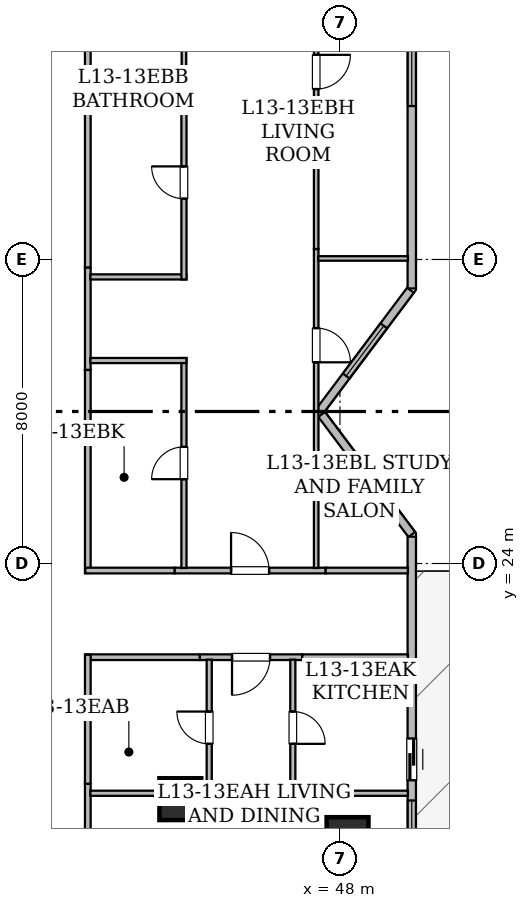
"""IFC4 building model, lengths in metres.
Left out: names, types, materials, properties, quantities, classifications, styles, units other than length and angle.
Written with IfcOpenShell. Run it as: python <this file> out.ifc"""

import sys

from ifc_helpers import new_model, si_unit, direction, frame, frame_2d, origin, origin_2d, place, context, subcontext, project, spatial, rectangle, hollow_rectangle, extrude, element, fill, save


model = new_model("IFC4")
c1 = context("Model", 3, precision=1e-05, world=origin(), true_north=direction((0.0, 1.0)))
c2 = subcontext(c1, "Body", "Model", "MODEL_VIEW")
j1 = project(units=[si_unit("LENGTHUNIT", "METRE"), si_unit("PLANEANGLEUNIT", "RADIAN")], contexts=[c1])
p1 = place(None, origin())
s1 = spatial("IfcSite", under=j1, at=p1, CompositionType="ELEMENT")
p2 = place(p1, origin())
s2 = spatial("IfcBuilding", under=s1, at=p2, CompositionType="ELEMENT")
p3 = place(p2, frame((0.0, 0.0, 55.2)))
s3 = spatial("IfcBuildingStorey", under=s2, at=p3, CompositionType="ELEMENT", Elevation=55.2)
for number, where, z_axis, x_axis in (
    (1, (48.2, 16.775, 0.0), (0.0, 0.0, 1.0), (1.0, 0.0, 0.0)),
    (2, (43.8, 17.8, 0.0), (0.0, 0.0, 1.0), (1.0, 0.0, 0.0)),
):
    element("IfcColumn", number, at=place(p3, frame(where, z_axis=z_axis, x_axis=x_axis)), inside=s3, PredefinedType="COLUMN", context=c2, shape_type="SweptSolid", body=[
        extrude(hollow_rectangle(XDim=1.1, YDim=1.1, WallThickness=0.055, at=origin_2d()), origin(), (0.0, 0.0, 1.0), 3.65),
    ])
p4 = place(p3, frame((49.89, 48.683, 0.0), z_axis=(0.0, 0.0, 1.0), x_axis=(0.0, -1.0, 0.0)))
e3 = element("IfcWall", 3, at=p4, inside=s3, PredefinedType="STANDARD", context=c2, shape_type="SweptSolid", body=[
    extrude(rectangle(XDim=17.446, YDim=0.22, at=frame_2d((8.723, 0.0))), origin(), (0.0, 0.0, 1.0), 3.43),
])
p5 = place(p4, frame((10.996, 0.0, 0.85)))
e4 = element("IfcOpeningElement", 4, at=p5, cuts=e3, PredefinedType="OPENING", context=c2, shape_type="SweptSolid", body=[
    extrude(rectangle(XDim=1.65, YDim=1.55, at=frame_2d((0.825, 0.775))), frame((0.0, 0.12, 0.0), z_axis=(0.0, -1.0, 0.0), x_axis=(1.0, 0.0, 0.0)), (0.0, 0.0, 1.0), 0.24),
])
p6 = place(p4, frame((3.061, 0.0, 0.85)))
e5 = element("IfcOpeningElement", 5, at=p6, cuts=e3, PredefinedType="OPENING", context=c2, shape_type="SweptSolid", body=[
    extrude(rectangle(XDim=1.65, YDim=1.55, at=frame_2d((0.825, 0.775))), frame((0.0, 0.12, 0.0), z_axis=(0.0, -1.0, 0.0), x_axis=(1.0, 0.0, 0.0)), (0.0, 0.0, 1.0), 0.24),
])
p7 = place(p3, frame((49.856, 31.191, 0.0), z_axis=(0.0, 0.0, 1.0), x_axis=(-0.600137081448, -0.799897170561, 0.0)))
e6 = element("IfcWall", 6, at=p7, inside=s3, PredefinedType="STANDARD", context=c2, shape_type="SweptSolid", body=[
    extrude(rectangle(XDim=3.989, YDim=0.22, at=frame_2d((1.995, 0.0))), origin(), (0.0, 0.0, 1.0), 3.43),
])
p8 = place(p7, frame((1.17, 0.0, 0.85)))
e7 = element("IfcOpeningElement", 7, at=p8, cuts=e6, PredefinedType="OPENING", context=c2, shape_type="SweptSolid", body=[
    extrude(rectangle(XDim=1.65, YDim=1.55, at=frame_2d((0.825, 0.775))), frame((0.0, 0.12, 0.0), z_axis=(0.0, -1.0, 0.0), x_axis=(1.0, 0.0, 0.0)), (0.0, 0.0, 1.0), 0.24),
])
p9 = place(p3, frame((47.519, 27.923, 0.0), z_axis=(0.0, 0.0, 1.0), x_axis=(0.600118645218, -0.799911002338, 0.0)))
e8 = element("IfcWall", 8, at=p9, inside=s3, PredefinedType="STANDARD", context=c2, shape_type="SweptSolid", body=[
    extrude(rectangle(XDim=3.951, YDim=0.22, at=frame_2d((1.975, 0.0))), origin(), (0.0, 0.0, 1.0), 3.43),
])
p10 = place(p3, frame((49.89, 24.707, 0.0), z_axis=(0.0, 0.0, 1.0), x_axis=(0.0, -1.0, 0.0)))
e9 = element("IfcWall", 9, at=p10, inside=s3, PredefinedType="STANDARD", context=c2, shape_type="SweptSolid", body=[
    extrude(rectangle(XDim=17.461, YDim=0.22, at=frame_2d((8.73, 0.0))), origin(), (0.0, 0.0, 1.0), 3.43),
])
p11 = place(p10, frame((5.311, 0.0, 0.0)))
e10 = element("IfcOpeningElement", 10, at=p11, cuts=e9, PredefinedType="OPENING", context=c2, shape_type="SweptSolid", body=[
    extrude(rectangle(XDim=1.1, YDim=2.2, at=frame_2d((0.55, 1.1))), frame((0.0, 0.12, 0.0), z_axis=(0.0, -1.0, 0.0), x_axis=(1.0, 0.0, 0.0)), (0.0, 0.0, 1.0), 0.24),
])
p12 = place(p10, frame((6.942, 0.0, 0.8)))
e11 = element("IfcOpeningElement", 11, at=p12, cuts=e9, PredefinedType="OPENING", context=c2, shape_type="SweptSolid", body=[
    extrude(rectangle(XDim=1.2, YDim=1.5, at=frame_2d((0.6, 0.75))), frame((0.0, 0.12, 0.0), z_axis=(0.0, -1.0, 0.0), x_axis=(1.0, 0.0, 0.0)), (0.0, 0.0, 1.0), 0.24),
])
p13 = place(p10, frame((11.679, 0.0, 0.85)))
e12 = element("IfcOpeningElement", 12, at=p13, cuts=e9, PredefinedType="OPENING", context=c2, shape_type="SweptSolid", body=[
    extrude(rectangle(XDim=1.65, YDim=1.55, at=frame_2d((0.825, 0.775))), frame((0.0, 0.12, 0.0), z_axis=(0.0, -1.0, 0.0), x_axis=(1.0, 0.0, 0.0)), (0.0, 0.0, 1.0), 0.24),
])
p14 = place(p3, frame((47.009, 21.535, 0.0), z_axis=(0.0, 0.0, 1.0), x_axis=(-1.0, 0.0, 0.0)))
e13 = element("IfcWall", 13, at=p14, inside=s3, PredefinedType="STANDARD", context=c2, shape_type="SweptSolid", body=[
    extrude(rectangle(XDim=2.698, YDim=0.15, at=frame_2d((1.349, 0.0))), origin(), (0.0, 0.0, 1.0), 3.43),
])
p15 = place(p14, frame((0.849, 0.0, 0.0)))
e14 = element("IfcOpeningElement", 14, at=p15, cuts=e13, PredefinedType="OPENING", context=c2, shape_type="SweptSolid", body=[
    extrude(rectangle(XDim=1.0, YDim=2.15, at=frame_2d((0.5, 1.075))), frame((0.0, 0.085, 0.0), z_axis=(0.0, -1.0, 0.0), x_axis=(1.0, 0.0, 0.0)), (0.0, 0.0, 1.0), 0.17),
])
p16 = place(p3, frame((41.365, 18.204, 0.0), z_axis=(0.0, 0.0, 1.0), x_axis=(0.0, -1.0, 0.0)))
e15 = element("IfcWall", 15, at=p16, inside=s3, PredefinedType="STANDARD", context=c2, shape_type="SweptSolid", body=[
    extrude(rectangle(XDim=1.304, YDim=0.15, at=frame_2d((0.652, 0.0))), origin(), (0.0, 0.0, 1.0), 3.43),
])
p17 = place(p3, frame((44.311, 21.535, 0.0), z_axis=(0.0, 0.0, 1.0), x_axis=(-1.0, 0.0, 0.0)))
e16 = element("IfcWall", 16, at=p17, inside=s3, PredefinedType="STANDARD", context=c2, shape_type="SweptSolid", body=[
    extrude(rectangle(XDim=3.011, YDim=0.15, at=frame_2d((1.505, 0.0))), origin(), (0.0, 0.0, 1.0), 2.647),
])
p18 = place(p3, frame((41.365, 21.6, 0.0), z_axis=(0.0, 0.0, 1.0), x_axis=(0.0, -1.0, 0.0)))
e17 = element("IfcWall", 17, at=p18, inside=s3, PredefinedType="STANDARD", context=c2, shape_type="SweptSolid", body=[
    extrude(rectangle(XDim=3.396, YDim=0.15, at=frame_2d((1.698, 0.0))), origin(), (0.0, 0.0, 1.0), 2.647),
])
p19 = place(p3, frame((49.788, 21.535, 0.0), z_axis=(0.0, 0.0, 1.0), x_axis=(-1.0, 0.0, 0.0)))
e18 = element("IfcWall", 18, at=p19, inside=s3, PredefinedType="STANDARD", context=c2, shape_type="SweptSolid", body=[
    extrude(rectangle(XDim=2.779, YDim=0.15, at=frame_2d((1.39, 0.0))), origin(), (0.0, 0.0, 1.0), 2.803),
])
p20 = place(p3, frame((41.365, 39.1, 0.0), z_axis=(0.0, 0.0, 1.0), x_axis=(0.0, -1.0, 0.0)))
e19 = element("IfcWall", 19, at=p20, inside=s3, PredefinedType="STANDARD", context=c2, shape_type="SweptSolid", body=[
    extrude(rectangle(XDim=2.843, YDim=0.15, at=frame_2d((1.421, 0.0))), origin(), (0.0, 0.0, 1.0), 2.647),
])
p21 = place(p3, frame((41.365, 31.79, 0.0), z_axis=(0.0, 0.0, 1.0), x_axis=(0.0, -1.0, 0.0)))
e20 = element("IfcWall", 20, at=p21, inside=s3, PredefinedType="STANDARD", context=c2, shape_type="SweptSolid", body=[
    extrude(rectangle(XDim=2.698, YDim=0.15, at=frame_2d((1.349, 0.0))), origin(), (0.0, 0.0, 1.0), 3.43),
])
p22 = place(p3, frame((43.646, 23.815, 0.0), z_axis=(0.0, 0.0, 1.0), x_axis=(1.0, 0.0, 0.0)))
e21 = element("IfcWall", 21, at=p22, inside=s3, PredefinedType="STANDARD", context=c2, shape_type="SweptSolid", body=[
    extrude(rectangle(XDim=3.978, YDim=0.15, at=frame_2d((1.989, 0.0))), origin(), (0.0, 0.0, 1.0), 2.647),
])
p23 = place(p22, frame((1.489, 0.0, 0.0)))
e22 = element("IfcOpeningElement", 22, at=p23, cuts=e21, PredefinedType="OPENING", context=c2, shape_type="SweptSolid", body=[
    extrude(rectangle(XDim=1.0, YDim=2.15, at=frame_2d((0.5, 1.075))), frame((0.0, 0.085, 0.0), z_axis=(0.0, -1.0, 0.0), x_axis=(1.0, 0.0, 0.0)), (0.0, 0.0, 1.0), 0.17),
])
p24 = place(p3, frame((41.365, 36.257, 0.0), z_axis=(0.0, 0.0, 1.0), x_axis=(0.0, -1.0, 0.0)))
e23 = element("IfcWall", 23, at=p24, inside=s3, PredefinedType="STANDARD", context=c2, shape_type="SweptSolid", body=[
    extrude(rectangle(XDim=4.467, YDim=0.15, at=frame_2d((2.233, 0.0))), origin(), (0.0, 0.0, 1.0), 3.43),
])
p25 = place(p3, frame((41.365, 29.092, 0.0), z_axis=(0.0, 0.0, 1.0), x_axis=(0.0, -1.0, 0.0)))
e24 = element("IfcWall", 24, at=p25, inside=s3, PredefinedType="STANDARD", context=c2, shape_type="SweptSolid", body=[
    extrude(rectangle(XDim=5.342, YDim=0.15, at=frame_2d((2.671, 0.0))), origin(), (0.0, 0.0, 1.0), 2.957),
])
p26 = place(p3, frame((41.3, 23.815, 0.0), z_axis=(0.0, 0.0, 1.0), x_axis=(1.0, 0.0, 0.0)))
e25 = element("IfcWall", 25, at=p26, inside=s3, PredefinedType="STANDARD", context=c2, shape_type="SweptSolid", body=[
    extrude(rectangle(XDim=2.346, YDim=0.15, at=frame_2d((1.173, 0.0))), origin(), (0.0, 0.0, 1.0), 2.647),
])
p27 = place(p3, frame((47.624, 23.815, 0.0), z_axis=(0.0, 0.0, 1.0), x_axis=(1.0, 0.0, 0.0)))
e26 = element("IfcWall", 26, at=p27, inside=s3, PredefinedType="STANDARD", context=c2, shape_type="SweptSolid", body=[
    extrude(rectangle(XDim=2.164, YDim=0.15, at=frame_2d((1.082, 0.0))), origin(), (0.0, 0.0, 1.0), 2.803),
])
p28 = place(p3, frame((41.432, 17.955, 0.0), z_axis=(0.0, 0.0, 1.0), x_axis=(1.0, 0.0, 0.0)))
e27 = element("IfcWall", 27, at=p28, inside=s3, PredefinedType="PARTITIONING", context=c2, shape_type="SweptSolid", body=[
    extrude(rectangle(XDim=3.193, YDim=0.135, at=frame_2d((1.597, 0.0))), origin(), (0.0, 0.0, 1.0), 2.647),
])
p29 = place(p3, frame((44.56, 17.89, 0.0), z_axis=(0.0, 0.0, 1.0), x_axis=(0.0, 1.0, 0.0)))
e28 = element("IfcWall", 28, at=p29, inside=s3, PredefinedType="PARTITIONING", context=c2, shape_type="SweptSolid", body=[
    extrude(rectangle(XDim=3.58, YDim=0.135, at=frame_2d((1.79, 0.0))), origin(), (0.0, 0.0, 1.0), 3.43),
])
p30 = place(p29, frame((1.365, 0.0, 0.0)))
e29 = element("IfcOpeningElement", 29, at=p30, cuts=e28, PredefinedType="OPENING", context=c2, shape_type="SweptSolid", body=[
    extrude(rectangle(XDim=0.85, YDim=2.1, at=frame_2d((0.425, 1.05))), frame((0.0, 0.077, 0.0), z_axis=(0.0, -1.0, 0.0), x_axis=(1.0, 0.0, 0.0)), (0.0, 0.0, 1.0), 0.155),
])
p31 = place(p3, frame((46.76, 21.47, 0.0), z_axis=(0.0, 0.0, 1.0), x_axis=(0.0, -1.0, 0.0)))
e30 = element("IfcWall", 30, at=p31, inside=s3, PredefinedType="PARTITIONING", context=c2, shape_type="SweptSolid", body=[
    extrude(rectangle(XDim=3.58, YDim=0.135, at=frame_2d((1.79, 0.0))), origin(), (0.0, 0.0, 1.0), 3.43),
])
p32 = place(p31, frame((1.365, 0.0, 0.0)))
e31 = element("IfcOpeningElement", 31, at=p32, cuts=e30, PredefinedType="OPENING", context=c2, shape_type="SweptSolid", body=[
    extrude(rectangle(XDim=0.85, YDim=2.1, at=frame_2d((0.425, 1.05))), frame((0.0, 0.077, 0.0), z_axis=(0.0, -1.0, 0.0), x_axis=(1.0, 0.0, 0.0)), (0.0, 0.0, 1.0), 0.155),
])
p33 = place(p3, frame((46.695, 17.955, 0.0), z_axis=(0.0, 0.0, 1.0), x_axis=(1.0, 0.0, 0.0)))
e32 = element("IfcWall", 32, at=p33, inside=s3, PredefinedType="PARTITIONING", context=c2, shape_type="SweptSolid", body=[
    extrude(rectangle(XDim=3.093, YDim=0.135, at=frame_2d((1.546, 0.0))), origin(), (0.0, 0.0, 1.0), 2.803),
])
p34 = place(p3, frame((43.895, 42.18, 0.0), z_axis=(0.0, 0.0, 1.0), x_axis=(0.0, -1.0, 0.0)))
e33 = element("IfcWall", 33, at=p34, inside=s3, PredefinedType="PARTITIONING", context=c2, shape_type="SweptSolid", body=[
    extrude(rectangle(XDim=5.609, YDim=0.12, at=frame_2d((2.804, 0.0))), origin(), (0.0, 0.0, 1.0), 2.647),
])
p35 = place(p34, frame((2.375, 0.0, 0.0)))
e34 = element("IfcOpeningElement", 34, at=p35, cuts=e33, PredefinedType="OPENING", context=c2, shape_type="SweptSolid", body=[
    extrude(rectangle(XDim=0.9, YDim=2.1, at=frame_2d((0.45, 1.05))), frame((0.0, 0.07, 0.0), z_axis=(0.0, -1.0, 0.0), x_axis=(1.0, 0.0, 0.0)), (0.0, 0.0, 1.0), 0.14),
])
p36 = place(p3, frame((43.83, 36.506, 0.0), z_axis=(0.0, 0.0, 1.0), x_axis=(-1.0, 0.0, 0.0)))
e35 = element("IfcWall", 35, at=p36, inside=s3, PredefinedType="PARTITIONING", context=c2, shape_type="SweptSolid", body=[
    extrude(rectangle(XDim=2.398, YDim=0.135, at=frame_2d((1.199, 0.0))), origin(), (0.0, 0.0, 1.0), 2.647),
])
p37 = place(p3, frame((41.432, 31.541, 0.0), z_axis=(0.0, 0.0, 1.0), x_axis=(1.0, 0.0, 0.0)))
e36 = element("IfcWall", 36, at=p37, inside=s3, PredefinedType="PARTITIONING", context=c2, shape_type="SweptSolid", body=[
    extrude(rectangle(XDim=2.528, YDim=0.135, at=frame_2d((1.264, 0.0))), origin(), (0.0, 0.0, 1.0), 2.647),
])
p38 = place(p3, frame((43.895, 31.476, 0.0), z_axis=(0.0, 0.0, 1.0), x_axis=(0.0, 1.0, 0.0)))
e37 = element("IfcWall", 37, at=p38, inside=s3, PredefinedType="PARTITIONING", context=c2, shape_type="SweptSolid", body=[
    extrude(rectangle(XDim=5.095, YDim=0.135, at=frame_2d((2.547, 0.0))), origin(), (0.0, 0.0, 1.0), 2.647),
])
p39 = place(p38, frame((2.123, 0.0, 0.0)))
e38 = element("IfcOpeningElement", 38, at=p39, cuts=e37, PredefinedType="OPENING", context=c2, shape_type="SweptSolid", body=[
    extrude(rectangle(XDim=0.85, YDim=2.1, at=frame_2d((0.425, 1.05))), frame((0.0, 0.077, 0.0), z_axis=(0.0, -1.0, 0.0), x_axis=(1.0, 0.0, 0.0)), (0.0, 0.0, 1.0), 0.155),
])
p40 = place(p3, frame((43.895, 23.882, 0.0), z_axis=(0.0, 0.0, 1.0), x_axis=(0.0, 1.0, 0.0)))
e39 = element("IfcWall", 39, at=p40, inside=s3, PredefinedType="PARTITIONING", context=c2, shape_type="SweptSolid", body=[
    extrude(rectangle(XDim=5.524, YDim=0.135, at=frame_2d((2.762, 0.0))), origin(), (0.0, 0.0, 1.0), 2.647),
])
p41 = place(p40, frame((2.337, 0.0, 0.0)))
e40 = element("IfcOpeningElement", 40, at=p41, cuts=e39, PredefinedType="OPENING", context=c2, shape_type="SweptSolid", body=[
    extrude(rectangle(XDim=0.85, YDim=2.1, at=frame_2d((0.425, 1.05))), frame((0.0, 0.077, 0.0), z_axis=(0.0, -1.0, 0.0), x_axis=(1.0, 0.0, 0.0)), (0.0, 0.0, 1.0), 0.155),
])
p42 = place(p3, frame((43.96, 29.341, 0.0), z_axis=(0.0, 0.0, 1.0), x_axis=(-1.0, 0.0, 0.0)))
e41 = element("IfcWall", 41, at=p42, inside=s3, PredefinedType="PARTITIONING", context=c2, shape_type="SweptSolid", body=[
    extrude(rectangle(XDim=2.528, YDim=0.135, at=frame_2d((1.264, 0.0))), origin(), (0.0, 0.0, 1.0), 2.647),
])
p43 = place(p3, frame((47.375, 32.276, 0.0), z_axis=(0.0, 0.0, 1.0), x_axis=(0.0, -1.0, 0.0)))
e42 = element("IfcWall", 42, at=p43, inside=s3, PredefinedType="PARTITIONING", context=c2, shape_type="SweptSolid", body=[
    extrude(rectangle(XDim=8.394, YDim=0.12, at=frame_2d((4.197, 0.0))), origin(), (0.0, 0.0, 1.0), 2.957),
])
p44 = place(p43, frame((2.082, 0.0, 0.0)))
e43 = element("IfcOpeningElement", 43, at=p44, cuts=e42, PredefinedType="OPENING", context=c2, shape_type="SweptSolid", body=[
    extrude(rectangle(XDim=0.9, YDim=2.1, at=frame_2d((0.45, 1.05))), frame((0.0, 0.07, 0.0), z_axis=(0.0, -1.0, 0.0), x_axis=(1.0, 0.0, 0.0)), (0.0, 0.0, 1.0), 0.14),
])
p45 = place(p3, frame((47.375, 41.591, 0.0), z_axis=(0.0, 0.0, 1.0), x_axis=(0.0, -1.0, 0.0)))
e44 = element("IfcWall", 44, at=p45, inside=s3, PredefinedType="PARTITIONING", context=c2, shape_type="SweptSolid", body=[
    extrude(rectangle(XDim=9.315, YDim=0.12, at=frame_2d((4.658, 0.0))), origin(), (0.0, 0.0, 1.0), 2.647),
])
p46 = place(p45, frame((4.207, 0.0, 0.0)))
e45 = element("IfcOpeningElement", 45, at=p46, cuts=e44, PredefinedType="OPENING", context=c2, shape_type="SweptSolid", body=[
    extrude(rectangle(XDim=0.9, YDim=2.1, at=frame_2d((0.45, 1.05))), frame((0.0, 0.07, 0.0), z_axis=(0.0, -1.0, 0.0), x_axis=(1.0, 0.0, 0.0)), (0.0, 0.0, 1.0), 0.14),
])
p47 = place(p3, frame((47.429, 32.027, 0.0), z_axis=(0.0, 0.0, 1.0), x_axis=(1.0, 0.0, 0.0)))
e46 = element("IfcWall", 46, at=p47, inside=s3, PredefinedType="PARTITIONING", context=c2, shape_type="SweptSolid", body=[
    extrude(rectangle(XDim=2.359, YDim=0.12, at=frame_2d((1.18, 0.0))), origin(), (0.0, 0.0, 1.0), 2.803),
])
p48 = place(p11, origin())
e47 = element("IfcDoor", 47, at=p48, inside=s3, OperationType="SLIDING_TO_LEFT", PredefinedType="DOOR", context=c2, shape_type="SweptSolid", body=[
    extrude(rectangle(XDim=1.1, YDim=2.2, at=frame_2d((0.55, 1.1))), frame((0.0, 0.025, 0.0), z_axis=(0.0, -1.0, 0.0), x_axis=(1.0, 0.0, 0.0)), (0.0, 0.0, 1.0), 0.05),
])
fill(e10, e47)
p49 = place(p12, origin())
e48 = element("IfcWindow", 48, at=p49, inside=s3, PartitioningType="SINGLE_PANEL", PredefinedType="WINDOW", context=c2, shape_type="SweptSolid", body=[
    extrude(rectangle(XDim=1.2, YDim=1.5, at=frame_2d((0.6, 0.75))), frame((0.0, 0.03, 0.0), z_axis=(0.0, -1.0, 0.0), x_axis=(1.0, 0.0, 0.0)), (0.0, 0.0, 1.0), 0.06),
])
fill(e11, e48)
p50 = place(p8, origin())
e49 = element("IfcWindow", 49, at=p50, inside=s3, PartitioningType="SINGLE_PANEL", PredefinedType="WINDOW", context=c2, shape_type="SweptSolid", body=[
    extrude(rectangle(XDim=1.65, YDim=1.55, at=frame_2d((0.825, 0.775))), frame((0.0, 0.03, 0.0), z_axis=(0.0, -1.0, 0.0), x_axis=(1.0, 0.0, 0.0)), (0.0, 0.0, 1.0), 0.06),
])
fill(e7, e49)
p51 = place(p5, origin())
e50 = element("IfcWindow", 50, at=p51, inside=s3, PartitioningType="SINGLE_PANEL", PredefinedType="WINDOW", context=c2, shape_type="SweptSolid", body=[
    extrude(rectangle(XDim=1.65, YDim=1.55, at=frame_2d((0.825, 0.775))), frame((0.0, 0.03, 0.0), z_axis=(0.0, -1.0, 0.0), x_axis=(1.0, 0.0, 0.0)), (0.0, 0.0, 1.0), 0.06),
])
fill(e4, e50)
p52 = place(p15, origin())
e51 = element("IfcDoor", 51, at=p52, inside=s3, OperationType="SINGLE_SWING_RIGHT", PredefinedType="DOOR", context=c2, shape_type="SweptSolid", body=[
    extrude(rectangle(XDim=1.0, YDim=2.15, at=frame_2d((0.5, 1.075))), frame((0.0, 0.025, 0.0), z_axis=(0.0, -1.0, 0.0), x_axis=(1.0, 0.0, 0.0)), (0.0, 0.0, 1.0), 0.05),
])
fill(e14, e51)
p53 = place(p23, origin())
e52 = element("IfcDoor", 52, at=p53, inside=s3, OperationType="SINGLE_SWING_LEFT", PredefinedType="DOOR", context=c2, shape_type="SweptSolid", body=[
    extrude(rectangle(XDim=1.0, YDim=2.15, at=frame_2d((0.5, 1.075))), frame((0.0, 0.025, 0.0), z_axis=(0.0, -1.0, 0.0), x_axis=(1.0, 0.0, 0.0)), (0.0, 0.0, 1.0), 0.05),
])
fill(e22, e52)
p54 = place(p30, origin())
e53 = element("IfcDoor", 53, at=p54, inside=s3, OperationType="SINGLE_SWING_RIGHT", PredefinedType="DOOR", context=c2, shape_type="SweptSolid", body=[
    extrude(rectangle(XDim=0.85, YDim=2.1, at=frame_2d((0.425, 1.05))), frame((0.0, 0.025, 0.0), z_axis=(0.0, -1.0, 0.0), x_axis=(1.0, 0.0, 0.0)), (0.0, 0.0, 1.0), 0.05),
])
fill(e29, e53)
p55 = place(p32, origin())
e54 = element("IfcDoor", 54, at=p55, inside=s3, OperationType="SINGLE_SWING_RIGHT", PredefinedType="DOOR", context=c2, shape_type="SweptSolid", body=[
    extrude(rectangle(XDim=0.85, YDim=2.1, at=frame_2d((0.425, 1.05))), frame((0.0, 0.025, 0.0), z_axis=(0.0, -1.0, 0.0), x_axis=(1.0, 0.0, 0.0)), (0.0, 0.0, 1.0), 0.05),
])
fill(e31, e54)
p56 = place(p39, origin())
e55 = element("IfcDoor", 55, at=p56, inside=s3, OperationType="SINGLE_SWING_RIGHT", PredefinedType="DOOR", context=c2, shape_type="SweptSolid", body=[
    extrude(rectangle(XDim=0.85, YDim=2.1, at=frame_2d((0.425, 1.05))), frame((0.0, 0.025, 0.0), z_axis=(0.0, -1.0, 0.0), x_axis=(1.0, 0.0, 0.0)), (0.0, 0.0, 1.0), 0.05),
])
fill(e38, e55)
p57 = place(p41, origin())
e56 = element("IfcDoor", 56, at=p57, inside=s3, OperationType="SINGLE_SWING_LEFT", PredefinedType="DOOR", context=c2, shape_type="SweptSolid", body=[
    extrude(rectangle(XDim=0.85, YDim=2.1, at=frame_2d((0.425, 1.05))), frame((0.0, 0.025, 0.0), z_axis=(0.0, -1.0, 0.0), x_axis=(1.0, 0.0, 0.0)), (0.0, 0.0, 1.0), 0.05),
])
fill(e40, e56)
p58 = place(p44, origin())
e57 = element("IfcDoor", 57, at=p58, inside=s3, OperationType="SINGLE_SWING_RIGHT", PredefinedType="DOOR", context=c2, shape_type="SweptSolid", body=[
    extrude(rectangle(XDim=0.9, YDim=2.1, at=frame_2d((0.45, 1.05))), frame((0.0, 0.025, 0.0), z_axis=(0.0, -1.0, 0.0), x_axis=(1.0, 0.0, 0.0)), (0.0, 0.0, 1.0), 0.05),
])
fill(e43, e57)
p59 = place(p46, origin())
e58 = element("IfcDoor", 58, at=p59, inside=s3, OperationType="SINGLE_SWING_LEFT", PredefinedType="DOOR", context=c2, shape_type="SweptSolid", body=[
    extrude(rectangle(XDim=0.9, YDim=2.1, at=frame_2d((0.45, 1.05))), frame((0.0, 0.025, 0.0), z_axis=(0.0, -1.0, 0.0), x_axis=(1.0, 0.0, 0.0)), (0.0, 0.0, 1.0), 0.05),
])
fill(e45, e58)
save(model, sys.argv[1])
